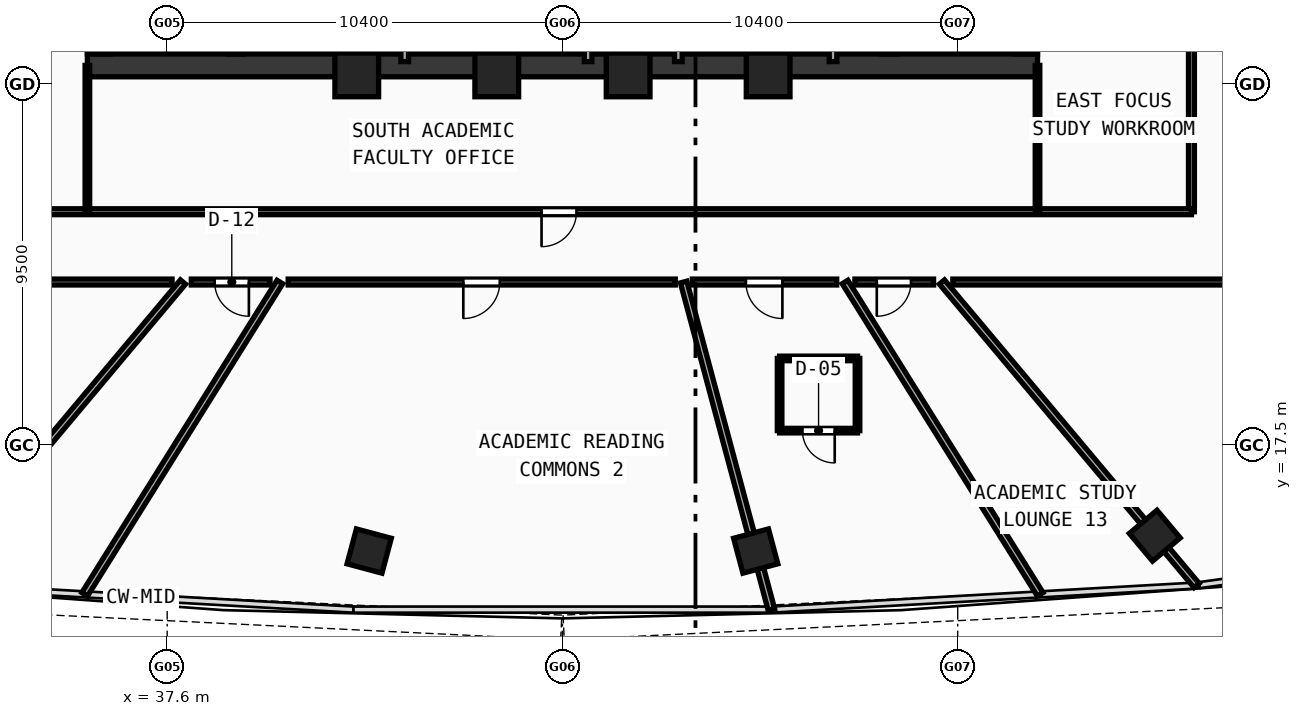
"""IFC4 building model, lengths in metres.
Left out: names, types, materials, properties, quantities, classifications, styles, units other than length and angle.
Written with IfcOpenShell. Run it as: python <this file> out.ifc"""

import sys

from ifc_helpers import new_model, si_unit, direction, frame, frame_2d, origin, origin_with_axes, origin_2d, place, context, subcontext, project, spatial, rectangle, hollow_rectangle, extrude, source, transform, mapped, element, fill, save


model = new_model("IFC4")
c1 = context("Model", 3, precision=1e-05, world=origin(), true_north=direction((0.0, 1.0)))
c2 = subcontext(c1, "Body", "Model", "MODEL_VIEW")
j1 = project(units=[si_unit("LENGTHUNIT", "METRE"), si_unit("PLANEANGLEUNIT", "RADIAN")], contexts=[c1])
p1 = place(None, origin())
s1 = spatial("IfcSite", under=j1, at=p1, CompositionType="ELEMENT")
p2 = place(p1, origin())
s2 = spatial("IfcBuilding", under=s1, at=p2, CompositionType="ELEMENT")
p3 = place(p2, frame((0.0, 0.0, 144.55)))
s3 = spatial("IfcBuildingStorey", under=s2, at=p3, CompositionType="ELEMENT", Elevation=144.55)
p4 = place(p3, frame((35.5, 27.5, 0.0), z_axis=(0.0, 0.0, 1.0), x_axis=(1.0, 0.0, 0.0)))
e1 = element("IfcWall", 1, at=p4, inside=s3, PredefinedType="SHEAR", context=c2, shape_type="SweptSolid", body=[
    extrude(rectangle(XDim=25.0, YDim=0.6, at=frame_2d((12.5, 0.0))), origin(), (0.0, 0.0, 1.0), 3.42),
])
for number, where, z_axis, x_axis in (
    (2, (35.8, 27.8, 0.0), (0.0, 0.0, 1.0), (0.0, 1.0, 0.0)),
    (3, (60.2, 27.8, 0.0), (0.0, 0.0, 1.0), (0.0, 1.0, 0.0)),
):
    element("IfcWall", number, at=place(p3, frame(where, z_axis=z_axis, x_axis=x_axis)), inside=s3, PredefinedType="SHEAR", context=c2, shape_type="SweptSolid", body=[
        extrude(rectangle(XDim=12.1, YDim=0.6, at=frame_2d((6.05, 0.0))), origin(), (0.0, 0.0, 1.0), 3.42),
    ])
p5 = place(p3, frame((39.4, 27.8, 0.0), z_axis=(0.0, 0.0, 1.0), x_axis=(0.0, 1.0, 0.0)))
e4 = element("IfcWall", 4, at=p5, inside=s3, PredefinedType="SHEAR", context=c2, shape_type="SweptSolid", body=[
    extrude(rectangle(XDim=12.1, YDim=0.4, at=frame_2d((6.05, 0.0))), origin(), (0.0, 0.0, 1.0), 3.42),
])
p6 = place(p5, frame((9.95, 0.0, 0.0)))
e5 = element("IfcOpeningElement", 5, at=p6, cuts=e4, PredefinedType="OPENING", context=c2, shape_type="SweptSolid", body=[
    extrude(rectangle(XDim=1.1, YDim=2.1, at=frame_2d((0.55, 1.05))), frame((0.0, 0.21, 0.0), z_axis=(0.0, -1.0, 0.0), x_axis=(1.0, 0.0, 0.0)), (0.0, 0.0, 1.0), 0.42),
])
p7 = place(p3, frame((56.6, 27.8, 0.0), z_axis=(0.0, 0.0, 1.0), x_axis=(0.0, 1.0, 0.0)))
e6 = element("IfcWall", 6, at=p7, inside=s3, PredefinedType="SHEAR", context=c2, shape_type="SweptSolid", body=[
    extrude(rectangle(XDim=12.1, YDim=0.4, at=frame_2d((6.05, 0.0))), origin(), (0.0, 0.0, 1.0), 3.42),
])
p8 = place(p7, frame((9.95, 0.0, 0.0)))
e7 = element("IfcOpeningElement", 7, at=p8, cuts=e6, PredefinedType="OPENING", context=c2, shape_type="SweptSolid", body=[
    extrude(rectangle(XDim=1.1, YDim=2.1, at=frame_2d((0.55, 1.05))), frame((0.0, 0.21, 0.0), z_axis=(0.0, -1.0, 0.0), x_axis=(1.0, 0.0, 0.0)), (0.0, 0.0, 1.0), 0.42),
])
m1 = source(origin(), c2, "Body", "SweptSolid", [
    extrude(hollow_rectangle(XDim=1.15, YDim=1.15, WallThickness=0.048, at=origin_2d()), origin(), (0.0, 0.0, 1.0), 3.68),
])
for number, where, z_axis, x_axis in (
    (8, (42.588, 27.25, -0.26), (0.0, 0.0, 1.0), (1.0, 0.0, 0.0)),
    (9, (46.272, 27.25, -0.26), (0.0, 0.0, 1.0), (1.0, 0.0, 0.0)),
    (10, (49.729, 27.25, -0.26), (0.0, 0.0, 1.0), (1.0, 0.0, 0.0)),
    (11, (53.412, 27.25, -0.26), (0.0, 0.0, 1.0), (1.0, 0.0, 0.0)),
):
    element("IfcColumn", number, at=place(p3, frame(where, z_axis=z_axis, x_axis=x_axis)), inside=s3, PredefinedType="COLUMN", context=c2, shape_type="MappedRepresentation", body=[
        mapped(m1, transform((0.0, 0.0, 0.0), scale=1.0)),
    ])
m2 = source(origin(), c2, "Body", "SweptSolid", [
    extrude(hollow_rectangle(XDim=0.95, YDim=0.95, WallThickness=0.04, at=origin_2d()), origin(), (0.0, 0.0, 1.0), 3.68),
])
for number, where, z_axis, x_axis in (
    (12, (42.915, 14.722, -0.26), (0.0, 0.0, 1.0), (0.966, -0.259, 0.0)),
    (13, (53.085, 14.722, -0.26), (0.0, 0.0, 1.0), (0.966, 0.259, 0.0)),
    (14, (63.585, 15.126, -0.26), (0.0, 0.0, 1.0), (0.766, 0.643, 0.0)),
):
    element("IfcColumn", number, at=place(p3, frame(where, z_axis=z_axis, x_axis=x_axis)), inside=s3, PredefinedType="COLUMN", context=c2, shape_type="MappedRepresentation", body=[
        mapped(m2, transform((0.0, 0.0, 0.0), scale=1.0)),
    ])
p9 = place(p3, frame((43.85, 27.6, 0.0), z_axis=(0.0, 0.0, 1.0), x_axis=(0.0, 1.0, 0.0)))
e15 = element("IfcWall", 15, at=p9, inside=s3, PredefinedType="SOLIDWALL", context=c2, shape_type="SweptSolid", body=[
    extrude(rectangle(XDim=6.22, YDim=0.2, at=frame_2d((3.11, 0.0))), origin(), (0.0, 0.0, 1.0), 3.42),
])
p10 = place(p9, frame((2.25, 0.0, 0.0)))
e16 = element("IfcOpeningElement", 16, at=p10, cuts=e15, PredefinedType="OPENING", context=c2, shape_type="SweptSolid", body=[
    extrude(rectangle(XDim=1.05, YDim=2.1, at=frame_2d((0.525, 1.05))), frame((0.0, 0.11, 0.0), z_axis=(0.0, -1.0, 0.0), x_axis=(1.0, 0.0, 0.0)), (0.0, 0.0, 1.0), 0.22),
])
p11 = place(p3, frame((53.68, 27.6, 0.0), z_axis=(0.0, 0.0, 1.0), x_axis=(0.0, 1.0, 0.0)))
e17 = element("IfcWall", 17, at=p11, inside=s3, PredefinedType="SOLIDWALL", context=c2, shape_type="SweptSolid", body=[
    extrude(rectangle(XDim=9.05, YDim=0.2, at=frame_2d((4.525, 0.0))), origin(), (0.0, 0.0, 1.0), 3.42),
])
p12 = place(p11, frame((6.9, 0.0, 0.0)))
e18 = element("IfcOpeningElement", 18, at=p12, cuts=e17, PredefinedType="OPENING", context=c2, shape_type="SweptSolid", body=[
    extrude(rectangle(XDim=1.05, YDim=2.1, at=frame_2d((0.525, 1.05))), frame((0.0, 0.11, 0.0), z_axis=(0.0, -1.0, 0.0), x_axis=(1.0, 0.0, 0.0)), (0.0, 0.0, 1.0), 0.22),
])
for number, where, z_axis, x_axis in (
    (19, (51.05, 27.6, 0.0), (0.0, 0.0, 1.0), (0.0, 1.0, 0.0)),
    (20, (46.225, 27.6, 0.0), (0.0, 0.0, 1.0), (0.0, 1.0, 0.0)),
    (21, (48.675, 27.6, 0.0), (0.0, 0.0, 1.0), (0.0, 1.0, 0.0)),
    (22, (55.12, 27.6, 0.0), (0.0, 0.0, 1.0), (0.0, 1.0, 0.0)),
):
    element("IfcWall", number, at=place(p3, frame(where, z_axis=z_axis, x_axis=x_axis)), inside=s3, PredefinedType="SOLIDWALL", context=c2, shape_type="SweptSolid", body=[
        extrude(rectangle(XDim=2.12, YDim=0.2, at=frame_2d((1.06, 0.0))), origin(), (0.0, 0.0, 1.0), 3.42),
    ])
p13 = place(p3, frame((42.32, 27.6, 0.0), z_axis=(0.0, 0.0, 1.0), x_axis=(0.0, 1.0, 0.0)))
e23 = element("IfcWall", 23, at=p13, inside=s3, PredefinedType="PARTITIONING", context=c2, shape_type="SweptSolid", body=[
    extrude(rectangle(XDim=5.9, YDim=0.155, at=frame_2d((2.95, 0.0))), origin(), (0.0, 0.0, 1.0), 3.42),
])
p14 = place(p13, frame((0.5, 0.0, 0.0)))
e24 = element("IfcOpeningElement", 24, at=p14, cuts=e23, PredefinedType="OPENING", context=c2, shape_type="SweptSolid", body=[
    extrude(rectangle(XDim=0.9, YDim=2.1, at=frame_2d((0.45, 1.05))), frame((0.0, 0.087, 0.0), z_axis=(0.0, -1.0, 0.0), x_axis=(1.0, 0.0, 0.0)), (0.0, 0.0, 1.0), 0.175),
])
p15 = place(p13, frame((2.45, 0.0, 0.0)))
e25 = element("IfcOpeningElement", 25, at=p15, cuts=e23, PredefinedType="OPENING", context=c2, shape_type="SweptSolid", body=[
    extrude(rectangle(XDim=0.9, YDim=2.1, at=frame_2d((0.45, 1.05))), frame((0.0, 0.087, 0.0), z_axis=(0.0, -1.0, 0.0), x_axis=(1.0, 0.0, 0.0)), (0.0, 0.0, 1.0), 0.175),
])
p16 = place(p13, frame((4.42, 0.0, 0.0)))
e26 = element("IfcOpeningElement", 26, at=p16, cuts=e23, PredefinedType="OPENING", context=c2, shape_type="SweptSolid", body=[
    extrude(rectangle(XDim=0.94, YDim=2.1, at=frame_2d((0.47, 1.05))), frame((0.0, 0.087, 0.0), z_axis=(0.0, -1.0, 0.0), x_axis=(1.0, 0.0, 0.0)), (0.0, 0.0, 1.0), 0.175),
])
p17 = place(p3, frame((64.55, 23.65, 0.0), z_axis=(0.0, 0.0, 1.0), x_axis=(0.0, 1.0, 0.0)))
e27 = element("IfcWall", 27, at=p17, inside=s3, PredefinedType="PARTITIONING", context=c2, shape_type="SweptSolid", body=[
    extrude(rectangle(XDim=16.6, YDim=0.155, at=frame_2d((8.3, 0.0))), origin(), (0.0, 0.0, 1.0), 2.77),
])
p18 = place(p17, frame((7.5, 0.0, 0.0)))
e28 = element("IfcOpeningElement", 28, at=p18, cuts=e27, PredefinedType="OPENING", context=c2, shape_type="SweptSolid", body=[
    extrude(rectangle(XDim=0.9, YDim=2.08, at=frame_2d((0.45, 1.04))), frame((0.0, 0.087, 0.0), z_axis=(0.0, -1.0, 0.0), x_axis=(1.0, 0.0, 0.0)), (0.0, 0.0, 1.0), 0.175),
])
p19 = place(p3, frame((31.45, 23.65, 0.0), z_axis=(0.0, 0.0, 1.0), x_axis=(1.0, 0.0, 0.0)))
e29 = element("IfcWall", 29, at=p19, inside=s3, PredefinedType="PARTITIONING", context=c2, shape_type="SweptSolid", body=[
    extrude(rectangle(XDim=33.1, YDim=0.155, at=frame_2d((16.55, 0.0))), origin(), (0.0, 0.0, 1.0), 2.77),
])
p20 = place(p19, frame((16.0, 0.0, 0.0)))
e30 = element("IfcOpeningElement", 30, at=p20, cuts=e29, PredefinedType="OPENING", context=c2, shape_type="SweptSolid", body=[
    extrude(rectangle(XDim=0.92, YDim=2.1, at=frame_2d((0.46, 1.05))), frame((0.0, 0.087, 0.0), z_axis=(0.0, -1.0, 0.0), x_axis=(1.0, 0.0, 0.0)), (0.0, 0.0, 1.0), 0.175),
])
for number, where, z_axis, x_axis in (
    (31, (35.5, 23.65, 0.0), (0.0, 0.0, 1.0), (0.0, 1.0, 0.0)),
    (32, (60.5, 23.65, 0.0), (0.0, 0.0, 1.0), (0.0, 1.0, 0.0)),
):
    element("IfcWall", number, at=place(p3, frame(where, z_axis=z_axis, x_axis=x_axis)), inside=s3, PredefinedType="PARTITIONING", context=c2, shape_type="SweptSolid", body=[
        extrude(rectangle(XDim=3.85, YDim=0.12, at=frame_2d((1.925, 0.0))), origin(), (0.0, 0.0, 1.0), 3.02),
    ])
p21 = place(p3, frame((38.015, 21.8, 0.0), z_axis=(0.0, 0.0, 1.0), x_axis=(-0.642781677101, -0.76604942111, 0.0)))
e33 = element("IfcWall", 33, at=p21, inside=s3, PredefinedType="PARTITIONING", context=c2, shape_type="SweptSolid", body=[
    extrude(rectangle(XDim=10.424, YDim=0.175, at=frame_2d((5.212, 0.0))), origin(), (0.0, 0.0, 1.0), 2.77),
])
p22 = place(p3, frame((40.564, 21.8, 0.0), z_axis=(0.0, 0.0, 1.0), x_axis=(-0.529931002604, -0.848040761096, 0.0)))
e34 = element("IfcWall", 34, at=p22, inside=s3, PredefinedType="PARTITIONING", context=c2, shape_type="SweptSolid", body=[
    extrude(rectangle(XDim=9.691, YDim=0.175, at=frame_2d((4.845, 0.0))), origin(), (0.0, 0.0, 1.0), 2.77),
])
p23 = place(p3, frame((51.189, 21.8, 0.0), z_axis=(0.0, 0.0, 1.0), x_axis=(0.258794890482, -0.965932298177, 0.0)))
e35 = element("IfcWall", 35, at=p23, inside=s3, PredefinedType="PARTITIONING", context=c2, shape_type="SweptSolid", body=[
    extrude(rectangle(XDim=8.923, YDim=0.175, at=frame_2d((4.462, 0.0))), origin(), (0.0, 0.0, 1.0), 2.77),
])
p24 = place(p3, frame((55.436, 21.8, 0.0), z_axis=(0.0, 0.0, 1.0), x_axis=(0.529931002604, -0.848040761096, 0.0)))
e36 = element("IfcWall", 36, at=p24, inside=s3, PredefinedType="PARTITIONING", context=c2, shape_type="SweptSolid", body=[
    extrude(rectangle(XDim=9.691, YDim=0.175, at=frame_2d((4.845, 0.0))), origin(), (0.0, 0.0, 1.0), 2.77),
])
p25 = place(p3, frame((57.985, 21.8, 0.0), z_axis=(0.0, 0.0, 1.0), x_axis=(0.642781677101, -0.76604942111, 0.0)))
e37 = element("IfcWall", 37, at=p25, inside=s3, PredefinedType="PARTITIONING", context=c2, shape_type="SweptSolid", body=[
    extrude(rectangle(XDim=10.424, YDim=0.175, at=frame_2d((5.212, 0.0))), origin(), (0.0, 0.0, 1.0), 2.77),
])
p26 = place(p3, frame((66.4, 21.8, 0.0), z_axis=(0.0, 0.0, 1.0), x_axis=(-1.0, 0.0, 0.0)))
e38 = element("IfcWall", 38, at=p26, inside=s3, PredefinedType="PARTITIONING", context=c2, shape_type="SweptSolid", body=[
    extrude(rectangle(XDim=8.127, YDim=0.155, at=frame_2d((4.064, 0.0))), origin(), (0.0, 0.0, 1.0), 3.02),
])
p27 = place(p3, frame((57.765, 21.8, 0.0), z_axis=(0.0, 0.0, 1.0), x_axis=(-1.0, 0.0, 0.0)))
e39 = element("IfcWall", 39, at=p27, inside=s3, PredefinedType="PARTITIONING", context=c2, shape_type="SweptSolid", body=[
    extrude(rectangle(XDim=2.07, YDim=0.155, at=frame_2d((1.035, 0.0))), origin(), (0.0, 0.0, 1.0), 2.77),
])
p28 = place(p27, frame((0.595, 0.0, 0.0)))
e40 = element("IfcOpeningElement", 40, at=p28, cuts=e39, PredefinedType="OPENING", context=c2, shape_type="SweptSolid", body=[
    extrude(rectangle(XDim=0.9, YDim=2.08, at=frame_2d((0.45, 1.04))), frame((0.0, 0.087, 0.0), z_axis=(0.0, -1.0, 0.0), x_axis=(1.0, 0.0, 0.0)), (0.0, 0.0, 1.0), 0.175),
])
p29 = place(p3, frame((55.216, 21.8, 0.0), z_axis=(0.0, 0.0, 1.0), x_axis=(-1.0, 0.0, 0.0)))
e41 = element("IfcWall", 41, at=p29, inside=s3, PredefinedType="PARTITIONING", context=c2, shape_type="SweptSolid", body=[
    extrude(rectangle(XDim=3.8, YDim=0.155, at=frame_2d((1.9, 0.0))), origin(), (0.0, 0.0, 1.0), 3.42),
])
p30 = place(p29, frame((1.429, 0.0, 0.0)))
e42 = element("IfcOpeningElement", 42, at=p30, cuts=e41, PredefinedType="OPENING", context=c2, shape_type="SweptSolid", body=[
    extrude(rectangle(XDim=0.96, YDim=2.12, at=frame_2d((0.48, 1.06))), frame((0.0, 0.087, 0.0), z_axis=(0.0, -1.0, 0.0), x_axis=(1.0, 0.0, 0.0)), (0.0, 0.0, 1.0), 0.175),
])
p31 = place(p3, frame((50.969, 21.8, 0.0), z_axis=(0.0, 0.0, 1.0), x_axis=(-1.0, 0.0, 0.0)))
e43 = element("IfcWall", 43, at=p31, inside=s3, PredefinedType="PARTITIONING", context=c2, shape_type="SweptSolid", body=[
    extrude(rectangle(XDim=10.185, YDim=0.155, at=frame_2d((5.092, 0.0))), origin(), (0.0, 0.0, 1.0), 2.77),
])
p32 = place(p31, frame((4.617, 0.0, 0.0)))
e44 = element("IfcOpeningElement", 44, at=p32, cuts=e43, PredefinedType="OPENING", context=c2, shape_type="SweptSolid", body=[
    extrude(rectangle(XDim=0.96, YDim=2.12, at=frame_2d((0.48, 1.06))), frame((0.0, 0.087, 0.0), z_axis=(0.0, -1.0, 0.0), x_axis=(1.0, 0.0, 0.0)), (0.0, 0.0, 1.0), 0.175),
])
p33 = place(p3, frame((40.305, 21.8, 0.0), z_axis=(0.0, 0.0, 1.0), x_axis=(-1.0, 0.0, 0.0)))
e45 = element("IfcWall", 45, at=p33, inside=s3, PredefinedType="PARTITIONING", context=c2, shape_type="SweptSolid", body=[
    extrude(rectangle(XDim=2.07, YDim=0.155, at=frame_2d((1.035, 0.0))), origin(), (0.0, 0.0, 1.0), 2.77),
])
p34 = place(p33, frame((0.555, 0.0, 0.0)))
e46 = element("IfcOpeningElement", 46, at=p34, cuts=e45, PredefinedType="OPENING", context=c2, shape_type="SweptSolid", body=[
    extrude(rectangle(XDim=0.9, YDim=2.08, at=frame_2d((0.45, 1.04))), frame((0.0, 0.087, 0.0), z_axis=(0.0, -1.0, 0.0), x_axis=(1.0, 0.0, 0.0)), (0.0, 0.0, 1.0), 0.175),
])
p35 = place(p3, frame((37.728, 21.8, 0.0), z_axis=(0.0, 0.0, 1.0), x_axis=(-1.0, 0.0, 0.0)))
e47 = element("IfcWall", 47, at=p35, inside=s3, PredefinedType="PARTITIONING", context=c2, shape_type="SweptSolid", body=[
    extrude(rectangle(XDim=8.127, YDim=0.155, at=frame_2d((4.064, 0.0))), origin(), (0.0, 0.0, 1.0), 3.02),
])
p36 = place(p3, frame((53.714, 17.89, 0.0), z_axis=(0.0, 0.0, 1.0), x_axis=(1.0, 0.0, 0.0)))
e48 = element("IfcWall", 48, at=p36, inside=s3, PredefinedType="PARTITIONING", context=c2, shape_type="SweptSolid", body=[
    extrude(rectangle(XDim=2.05, YDim=0.12, at=frame_2d((1.025, 0.0))), origin(), (0.0, 0.0, 1.0), 3.42),
])
p37 = place(p36, frame((0.6, 0.0, 0.0)))
e49 = element("IfcOpeningElement", 49, at=p37, cuts=e48, PredefinedType="OPENING", context=c2, shape_type="SweptSolid", body=[
    extrude(rectangle(XDim=0.85, YDim=2.1, at=frame_2d((0.425, 1.05))), frame((0.0, 0.07, 0.0), z_axis=(0.0, -1.0, 0.0), x_axis=(1.0, 0.0, 0.0)), (0.0, 0.0, 1.0), 0.14),
])
p38 = place(p3, frame((55.764, 17.89, 0.0), z_axis=(0.0, 0.0, 1.0), x_axis=(0.0, 1.0, 0.0)))
e50 = element("IfcWall", 50, at=p38, inside=s3, PredefinedType="PARTITIONING", context=c2, shape_type="SweptSolid", body=[
    extrude(rectangle(XDim=1.9, YDim=0.12, at=frame_2d((0.95, 0.0))), origin(), (0.0, 0.0, 1.0), 3.02),
])
p39 = place(p3, frame((55.764, 19.79, 0.0), z_axis=(0.0, 0.0, 1.0), x_axis=(-1.0, 0.0, 0.0)))
e51 = element("IfcWall", 51, at=p39, inside=s3, PredefinedType="PARTITIONING", context=c2, shape_type="SweptSolid", body=[
    extrude(rectangle(XDim=2.05, YDim=0.12, at=frame_2d((1.025, 0.0))), origin(), (0.0, 0.0, 1.0), 3.42),
])
p40 = place(p3, frame((53.714, 19.79, 0.0), z_axis=(0.0, 0.0, 1.0), x_axis=(0.0, -1.0, 0.0)))
e52 = element("IfcWall", 52, at=p40, inside=s3, PredefinedType="PARTITIONING", context=c2, shape_type="SweptSolid", body=[
    extrude(rectangle(XDim=1.9, YDim=0.12, at=frame_2d((0.95, 0.0))), origin(), (0.0, 0.0, 1.0), 3.02),
])
m3 = source(origin(), c2, "Body", "SweptSolid", [
    extrude(rectangle(XDim=0.92, YDim=2.1, at=frame_2d((0.46, 1.05))), frame((0.0, 0.025, 0.0), z_axis=(0.0, -1.0, 0.0), x_axis=(1.0, 0.0, 0.0)), (0.0, 0.0, 1.0), 0.05),
])
p41 = place(p20, frame((0.92, 0.0, 0.0), z_axis=(0.0, 0.0, 1.0), x_axis=(-1.0, 0.0, 0.0)))
e53 = element("IfcDoor", 53, at=p41, inside=s3, OperationType="SINGLE_SWING_RIGHT", PredefinedType="DOOR", context=c2, shape_type="MappedRepresentation", body=[
    mapped(m3, transform((0.0, 0.0, 0.0), scale=1.0)),
])
fill(e30, e53)
m4 = source(origin(), c2, "Body", "SweptSolid", [
    extrude(rectangle(XDim=0.9, YDim=2.08, at=frame_2d((0.45, 1.04))), frame((0.0, 0.025, 0.0), z_axis=(0.0, -1.0, 0.0), x_axis=(1.0, 0.0, 0.0)), (0.0, 0.0, 1.0), 0.05),
])
p42 = place(p34, origin_with_axes())
e54 = element("IfcDoor", 54, at=p42, inside=s3, OperationType="SINGLE_SWING_LEFT", PredefinedType="DOOR", context=c2, shape_type="MappedRepresentation", body=[
    mapped(m4, transform((0.0, 0.0, 0.0), scale=1.0)),
])
fill(e46, e54)
m5 = source(origin(), c2, "Body", "SweptSolid", [
    extrude(rectangle(XDim=0.96, YDim=2.12, at=frame_2d((0.48, 1.06))), frame((0.0, 0.025, 0.0), z_axis=(0.0, -1.0, 0.0), x_axis=(1.0, 0.0, 0.0)), (0.0, 0.0, 1.0), 0.05),
])
p43 = place(p32, origin_with_axes())
e55 = element("IfcDoor", 55, at=p43, inside=s3, OperationType="SINGLE_SWING_RIGHT", PredefinedType="DOOR", context=c2, shape_type="MappedRepresentation", body=[
    mapped(m5, transform((0.0, 0.0, 0.0), scale=1.0)),
])
fill(e44, e55)
p44 = place(p30, origin_with_axes())
e56 = element("IfcDoor", 56, at=p44, inside=s3, OperationType="SINGLE_SWING_LEFT", PredefinedType="DOOR", context=c2, shape_type="MappedRepresentation", body=[
    mapped(m5, transform((0.0, 0.0, 0.0), scale=1.0)),
])
fill(e42, e56)
m6 = source(origin(), c2, "Body", "SweptSolid", [
    extrude(rectangle(XDim=0.85, YDim=2.1, at=frame_2d((0.425, 1.05))), frame((0.0, 0.025, 0.0), z_axis=(0.0, -1.0, 0.0), x_axis=(1.0, 0.0, 0.0)), (0.0, 0.0, 1.0), 0.05),
])
p45 = place(p37, frame((0.85, 0.0, 0.0), z_axis=(0.0, 0.0, 1.0), x_axis=(-1.0, 0.0, 0.0)))
e57 = element("IfcDoor", 57, at=p45, inside=s3, OperationType="SINGLE_SWING_LEFT", PredefinedType="DOOR", context=c2, shape_type="MappedRepresentation", body=[
    mapped(m6, transform((0.0, 0.0, 0.0), scale=1.0)),
])
fill(e49, e57)
p46 = place(p28, origin_with_axes())
e58 = element("IfcDoor", 58, at=p46, inside=s3, OperationType="SINGLE_SWING_RIGHT", PredefinedType="DOOR", context=c2, shape_type="MappedRepresentation", body=[
    mapped(m4, transform((0.0, 0.0, 0.0), scale=1.0)),
])
fill(e40, e58)
save(model, sys.argv[1])
